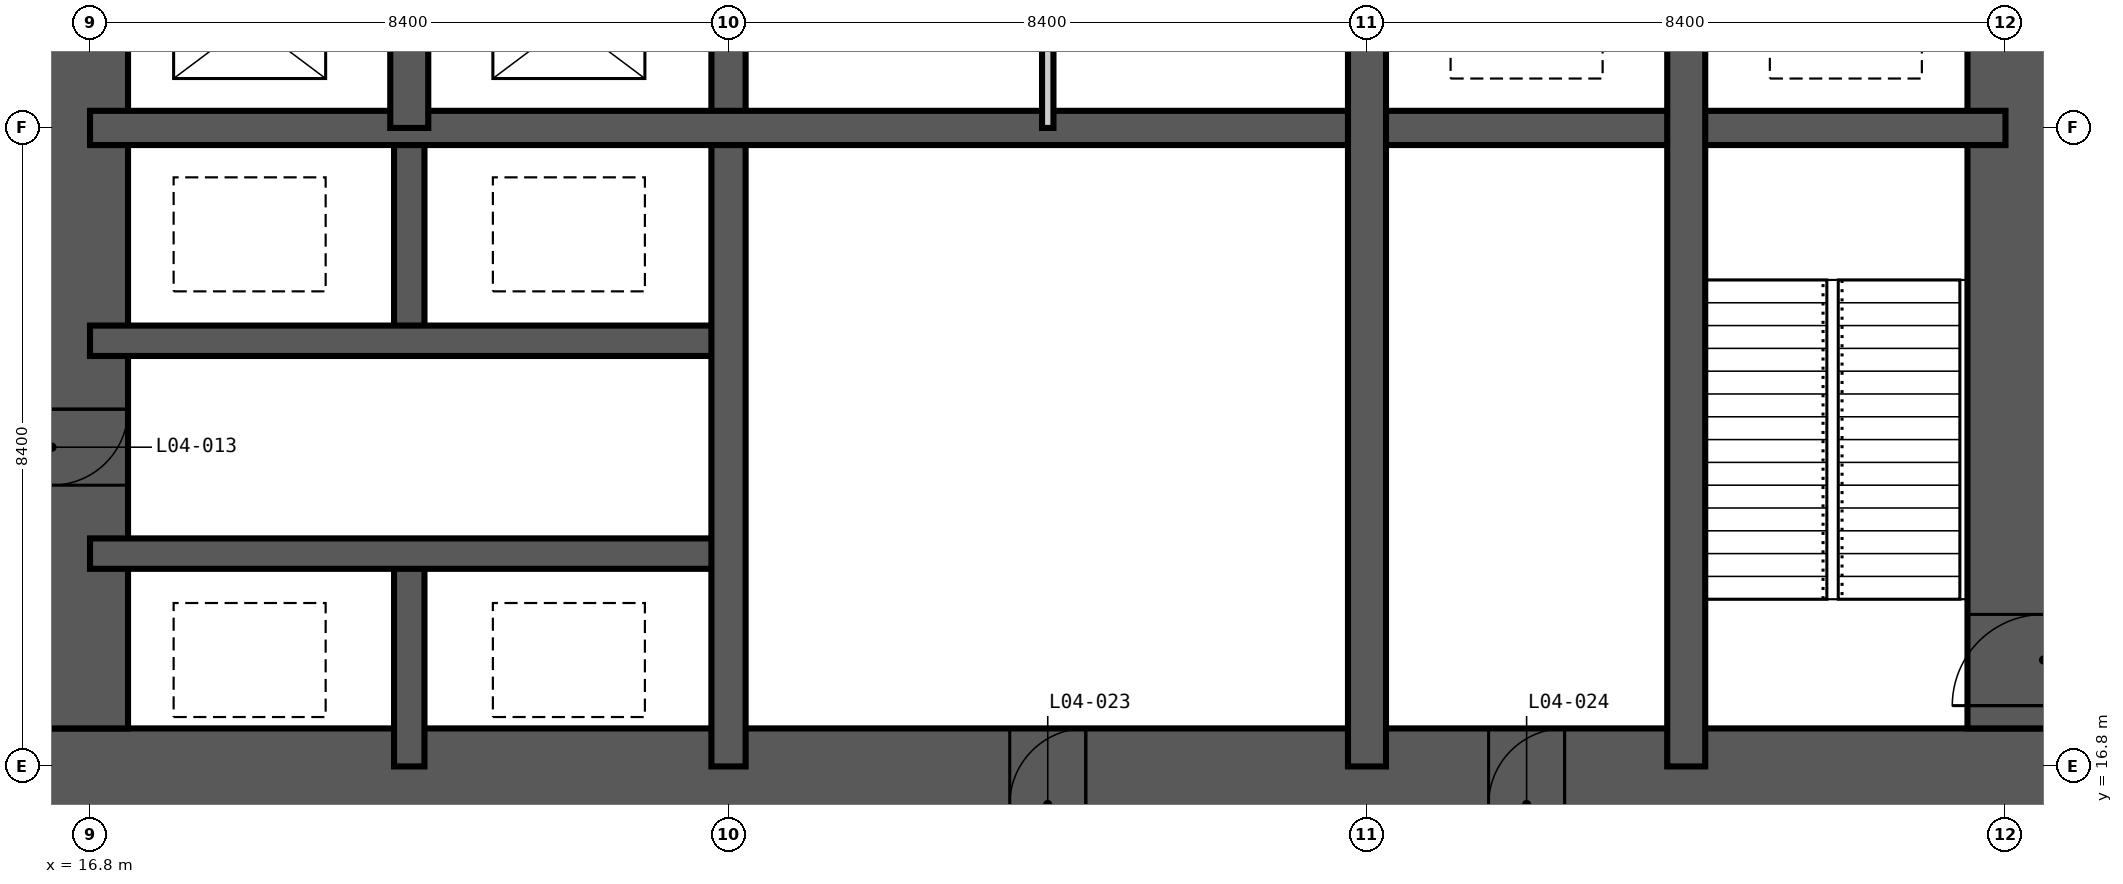
"""IFC4 building model, lengths in metres.
Left out: names, types, materials, properties, quantities, classifications, styles, units other than length and angle.
Written with IfcOpenShell. Run it as: python <this file> out.ifc"""

import sys

from ifc_helpers import new_model, si_unit, direction, frame, frame_2d, origin, place, context, subcontext, project, spatial, rectangle, extrude, element, fill, save


model = new_model("IFC4")
c1 = context("Model", 3, precision=1e-05, world=origin(), true_north=direction((0.0, 1.0)))
c2 = subcontext(c1, "Body", "Model", "MODEL_VIEW")
j1 = project(units=[si_unit("LENGTHUNIT", "METRE"), si_unit("PLANEANGLEUNIT", "RADIAN")], contexts=[c1])
p1 = place(None, origin())
s1 = spatial("IfcSite", under=j1, at=p1, CompositionType="ELEMENT")
p2 = place(p1, origin())
s2 = spatial("IfcBuilding", under=s1, at=p2, CompositionType="ELEMENT")
p3 = place(p2, frame((0.0, 0.0, 22.0)))
s3 = spatial("IfcBuildingStorey", under=s2, at=p3, CompositionType="ELEMENT", Elevation=22.0)
p4 = place(p3, frame((15.3, 16.3, -0.35), z_axis=(0.0, 0.0, 1.0), x_axis=(1.0, 0.0, 0.0)))
e1 = element("IfcWall", 1, at=p4, inside=s3, PredefinedType="SHEAR", context=c2, shape_type="SweptSolid", body=[
    extrude(rectangle(XDim=28.2, YDim=2.0, at=frame_2d((14.1, 0.0))), origin(), (0.0, 0.0, 1.0), 5.0),
])
p5 = place(p4, frame((13.6, 0.0, 0.35)))
e2 = element("IfcOpeningElement", 2, at=p5, cuts=e1, PredefinedType="OPENING", context=c2, shape_type="SweptSolid", body=[
    extrude(rectangle(XDim=1.0, YDim=2.1, at=frame_2d((0.5, 1.05))), frame((0.0, 1.01, 0.0), z_axis=(0.0, -1.0, 0.0), x_axis=(1.0, 0.0, 0.0)), (0.0, 0.0, 1.0), 2.02),
])
p6 = place(p4, frame((19.9, 0.0, 0.35)))
e3 = element("IfcOpeningElement", 3, at=p6, cuts=e1, PredefinedType="OPENING", context=c2, shape_type="SweptSolid", body=[
    extrude(rectangle(XDim=1.0, YDim=2.1, at=frame_2d((0.5, 1.05))), frame((0.0, 1.01, 0.0), z_axis=(0.0, -1.0, 0.0), x_axis=(1.0, 0.0, 0.0)), (0.0, 0.0, 1.0), 2.02),
])
p7 = place(p3, frame((42.5, 17.3, -0.35), z_axis=(0.0, 0.0, 1.0), x_axis=(0.0, 1.0, 0.0)))
e4 = element("IfcWall", 4, at=p7, inside=s3, PredefinedType="SHEAR", context=c2, shape_type="SweptSolid", body=[
    extrude(rectangle(XDim=24.2, YDim=2.0, at=frame_2d((12.1, 0.0))), origin(), (0.0, 0.0, 1.0), 5.0),
])
p8 = place(p7, frame((0.3, 0.0, 0.35)))
e5 = element("IfcOpeningElement", 5, at=p8, cuts=e4, PredefinedType="OPENING", context=c2, shape_type="SweptSolid", body=[
    extrude(rectangle(XDim=1.2, YDim=2.2, at=frame_2d((0.6, 1.1))), frame((0.0, 1.01, 0.0), z_axis=(0.0, -1.0, 0.0), x_axis=(1.0, 0.0, 0.0)), (0.0, 0.0, 1.0), 2.02),
])
p9 = place(p7, frame((11.6, 0.0, 0.35)))
e6 = element("IfcOpeningElement", 6, at=p9, cuts=e4, PredefinedType="OPENING", context=c2, shape_type="SweptSolid", body=[
    extrude(rectangle(XDim=1.0, YDim=2.1, at=frame_2d((0.5, 1.05))), frame((0.0, 1.01, 0.0), z_axis=(0.0, -1.0, 0.0), x_axis=(1.0, 0.0, 0.0)), (0.0, 0.0, 1.0), 2.02),
])
p10 = place(p7, frame((20.0, 0.0, 0.35)))
e7 = element("IfcOpeningElement", 7, at=p10, cuts=e4, PredefinedType="OPENING", context=c2, shape_type="SweptSolid", body=[
    extrude(rectangle(XDim=1.0, YDim=2.1, at=frame_2d((0.5, 1.05))), frame((0.0, 1.01, 0.0), z_axis=(0.0, -1.0, 0.0), x_axis=(1.0, 0.0, 0.0)), (0.0, 0.0, 1.0), 2.02),
])
p11 = place(p3, frame((16.3, 41.5, -0.35), z_axis=(0.0, 0.0, 1.0), x_axis=(0.0, -1.0, 0.0)))
e8 = element("IfcWall", 8, at=p11, inside=s3, PredefinedType="SHEAR", context=c2, shape_type="SweptSolid", body=[
    extrude(rectangle(XDim=24.2, YDim=2.0, at=frame_2d((12.1, 0.0))), origin(), (0.0, 0.0, 1.0), 5.0),
])
p12 = place(p11, frame((11.2, 0.0, 0.35)))
e9 = element("IfcOpeningElement", 9, at=p12, cuts=e8, PredefinedType="OPENING", context=c2, shape_type="SweptSolid", body=[
    extrude(rectangle(XDim=1.8, YDim=2.2, at=frame_2d((0.9, 1.1))), frame((0.0, 1.01, 0.0), z_axis=(0.0, -1.0, 0.0), x_axis=(1.0, 0.0, 0.0)), (0.0, 0.0, 1.0), 2.02),
])
p13 = place(p11, frame((20.0, 0.0, 0.35)))
e10 = element("IfcOpeningElement", 10, at=p13, cuts=e8, PredefinedType="OPENING", context=c2, shape_type="SweptSolid", body=[
    extrude(rectangle(XDim=1.0, YDim=2.1, at=frame_2d((0.5, 1.05))), frame((0.0, 1.01, 0.0), z_axis=(0.0, -1.0, 0.0), x_axis=(1.0, 0.0, 0.0)), (0.0, 0.0, 1.0), 2.02),
])
p14 = place(p11, frame((5.3, 0.0, 0.35)))
e11 = element("IfcOpeningElement", 11, at=p14, cuts=e8, PredefinedType="OPENING", context=c2, shape_type="SweptSolid", body=[
    extrude(rectangle(XDim=1.0, YDim=2.1, at=frame_2d((0.5, 1.05))), frame((0.0, 1.01, 0.0), z_axis=(0.0, -1.0, 0.0), x_axis=(1.0, 0.0, 0.0)), (0.0, 0.0, 1.0), 2.02),
])
for number, where, z_axis, x_axis in (
    (12, (21.0, 16.8, -0.35), (0.0, 0.0, 1.0), (0.0, 1.0, 0.0)),
    (13, (21.0, 22.4, -0.35), (0.0, 0.0, 1.0), (0.0, 1.0, 0.0)),
):
    element("IfcWall", number, at=place(p3, frame(where, z_axis=z_axis, x_axis=x_axis)), inside=s3, PredefinedType="SHEAR", context=c2, shape_type="SweptSolid", body=[
        extrude(rectangle(XDim=2.8, YDim=0.4, at=frame_2d((1.4, 0.0))), origin(), (0.0, 0.0, 1.0), 5.0),
    ])
for number, where, z_axis, x_axis in (
    (14, (16.8, 19.6, -0.35), (0.0, 0.0, 1.0), (1.0, 0.0, 0.0)),
    (15, (16.8, 22.4, -0.35), (0.0, 0.0, 1.0), (1.0, 0.0, 0.0)),
):
    element("IfcWall", number, at=place(p3, frame(where, z_axis=z_axis, x_axis=x_axis)), inside=s3, PredefinedType="SHEAR", context=c2, shape_type="SweptSolid", body=[
        extrude(rectangle(XDim=8.4, YDim=0.4, at=frame_2d((4.2, 0.0))), origin(), (0.0, 0.0, 1.0), 5.0),
    ])
for number, where, z_axis, x_axis in (
    (16, (25.2, 16.8, -0.35), (0.0, 0.0, 1.0), (0.0, 1.0, 0.0)),
    (17, (16.8, 25.2, -0.35), (0.0, 0.0, 1.0), (1.0, 0.0, 0.0)),
):
    element("IfcWall", number, at=place(p3, frame(where, z_axis=z_axis, x_axis=x_axis)), inside=s3, PredefinedType="SHEAR", context=c2, shape_type="SweptSolid", body=[
        extrude(rectangle(XDim=25.2, YDim=0.45, at=frame_2d((12.6, 0.0))), origin(), (0.0, 0.0, 1.0), 5.0),
    ])
p15 = place(p3, frame((21.0, 25.2, -0.35), z_axis=(0.0, 0.0, 1.0), x_axis=(0.0, 1.0, 0.0)))
e18 = element("IfcWall", 18, at=p15, inside=s3, PredefinedType="SHEAR", context=c2, shape_type="SweptSolid", body=[
    extrude(rectangle(XDim=2.8, YDim=0.5, at=frame_2d((1.4, 0.0))), origin(), (0.0, 0.0, 1.0), 5.0),
])
p16 = place(p3, frame((33.6, 16.8, -0.35), z_axis=(0.0, 0.0, 1.0), x_axis=(0.0, 1.0, 0.0)))
e19 = element("IfcWall", 19, at=p16, inside=s3, PredefinedType="SHEAR", context=c2, shape_type="SweptSolid", body=[
    extrude(rectangle(XDim=25.2, YDim=0.5, at=frame_2d((12.6, 0.0))), origin(), (0.0, 0.0, 1.0), 5.0),
])
p17 = place(p16, frame((22.5, 0.0, 0.35)))
e20 = element("IfcOpeningElement", 20, at=p17, cuts=e19, PredefinedType="OPENING", context=c2, shape_type="SweptSolid", body=[
    extrude(rectangle(XDim=1.2, YDim=2.2, at=frame_2d((0.6, 1.1))), frame((0.0, 0.26, 0.0), z_axis=(0.0, -1.0, 0.0), x_axis=(1.0, 0.0, 0.0)), (0.0, 0.0, 1.0), 0.52),
])
p18 = place(p16, frame((18.3, 0.0, 0.35)))
e21 = element("IfcOpeningElement", 21, at=p18, cuts=e19, PredefinedType="OPENING", context=c2, shape_type="SweptSolid", body=[
    extrude(rectangle(XDim=1.2, YDim=2.2, at=frame_2d((0.6, 1.1))), frame((0.0, 0.26, 0.0), z_axis=(0.0, -1.0, 0.0), x_axis=(1.0, 0.0, 0.0)), (0.0, 0.0, 1.0), 0.52),
])
p19 = place(p16, frame((12.1, 0.0, 0.35)))
e22 = element("IfcOpeningElement", 22, at=p19, cuts=e19, PredefinedType="OPENING", context=c2, shape_type="SweptSolid", body=[
    extrude(rectangle(XDim=1.0, YDim=2.1, at=frame_2d((0.5, 1.05))), frame((0.0, 0.26, 0.0), z_axis=(0.0, -1.0, 0.0), x_axis=(1.0, 0.0, 0.0)), (0.0, 0.0, 1.0), 0.52),
])
p20 = place(p3, frame((37.8, 16.8, -0.35), z_axis=(0.0, 0.0, 1.0), x_axis=(0.0, 1.0, 0.0)))
e23 = element("IfcWall", 23, at=p20, inside=s3, PredefinedType="SHEAR", context=c2, shape_type="SweptSolid", body=[
    extrude(rectangle(XDim=11.2, YDim=0.5, at=frame_2d((5.6, 0.0))), origin(), (0.0, 0.0, 1.0), 5.0),
])
p21 = place(p3, frame((29.4, 25.2, 0.0), z_axis=(0.0, 0.0, 1.0), x_axis=(0.0, 1.0, 0.0)))
e24 = element("IfcWall", 24, at=p21, inside=s3, PredefinedType="PARTITIONING", context=c2, shape_type="SweptSolid", body=[
    extrude(rectangle(XDim=8.4, YDim=0.15, at=frame_2d((4.2, 0.0))), origin(), (0.0, 0.0, 1.0), 4.65),
])
p22 = place(p21, frame((3.7, 0.0, 0.0)))
e25 = element("IfcOpeningElement", 25, at=p22, cuts=e24, PredefinedType="OPENING", context=c2, shape_type="SweptSolid", body=[
    extrude(rectangle(XDim=1.0, YDim=2.1, at=frame_2d((0.5, 1.05))), frame((0.0, 0.085, 0.0), z_axis=(0.0, -1.0, 0.0), x_axis=(1.0, 0.0, 0.0)), (0.0, 0.0, 1.0), 0.17),
])
p23 = place(p8, origin())
e26 = element("IfcDoor", 26, at=p23, inside=s3, OperationType="SINGLE_SWING_LEFT", PredefinedType="DOOR", context=c2, shape_type="SweptSolid", body=[
    extrude(rectangle(XDim=1.2, YDim=2.2, at=frame_2d((0.6, 1.1))), frame((0.0, 0.025, 0.0), z_axis=(0.0, -1.0, 0.0), x_axis=(1.0, 0.0, 0.0)), (0.0, 0.0, 1.0), 0.05),
])
fill(e5, e26)
p24 = place(p13, origin())
e27 = element("IfcDoor", 27, at=p24, inside=s3, OperationType="SINGLE_SWING_LEFT", PredefinedType="DOOR", context=c2, shape_type="SweptSolid", body=[
    extrude(rectangle(XDim=1.0, YDim=2.1, at=frame_2d((0.5, 1.05))), frame((0.0, 0.025, 0.0), z_axis=(0.0, -1.0, 0.0), x_axis=(1.0, 0.0, 0.0)), (0.0, 0.0, 1.0), 0.05),
])
fill(e10, e27)
p25 = place(p5, origin())
e28 = element("IfcDoor", 28, at=p25, inside=s3, OperationType="SINGLE_SWING_RIGHT", PredefinedType="DOOR", context=c2, shape_type="SweptSolid", body=[
    extrude(rectangle(XDim=1.0, YDim=2.1, at=frame_2d((0.5, 1.05))), frame((0.0, 0.025, 0.0), z_axis=(0.0, -1.0, 0.0), x_axis=(1.0, 0.0, 0.0)), (0.0, 0.0, 1.0), 0.05),
])
fill(e2, e28)
p26 = place(p6, origin())
e29 = element("IfcDoor", 29, at=p26, inside=s3, OperationType="SINGLE_SWING_RIGHT", PredefinedType="DOOR", context=c2, shape_type="SweptSolid", body=[
    extrude(rectangle(XDim=1.0, YDim=2.1, at=frame_2d((0.5, 1.05))), frame((0.0, 0.025, 0.0), z_axis=(0.0, -1.0, 0.0), x_axis=(1.0, 0.0, 0.0)), (0.0, 0.0, 1.0), 0.05),
])
fill(e3, e29)
save(model, sys.argv[1])
